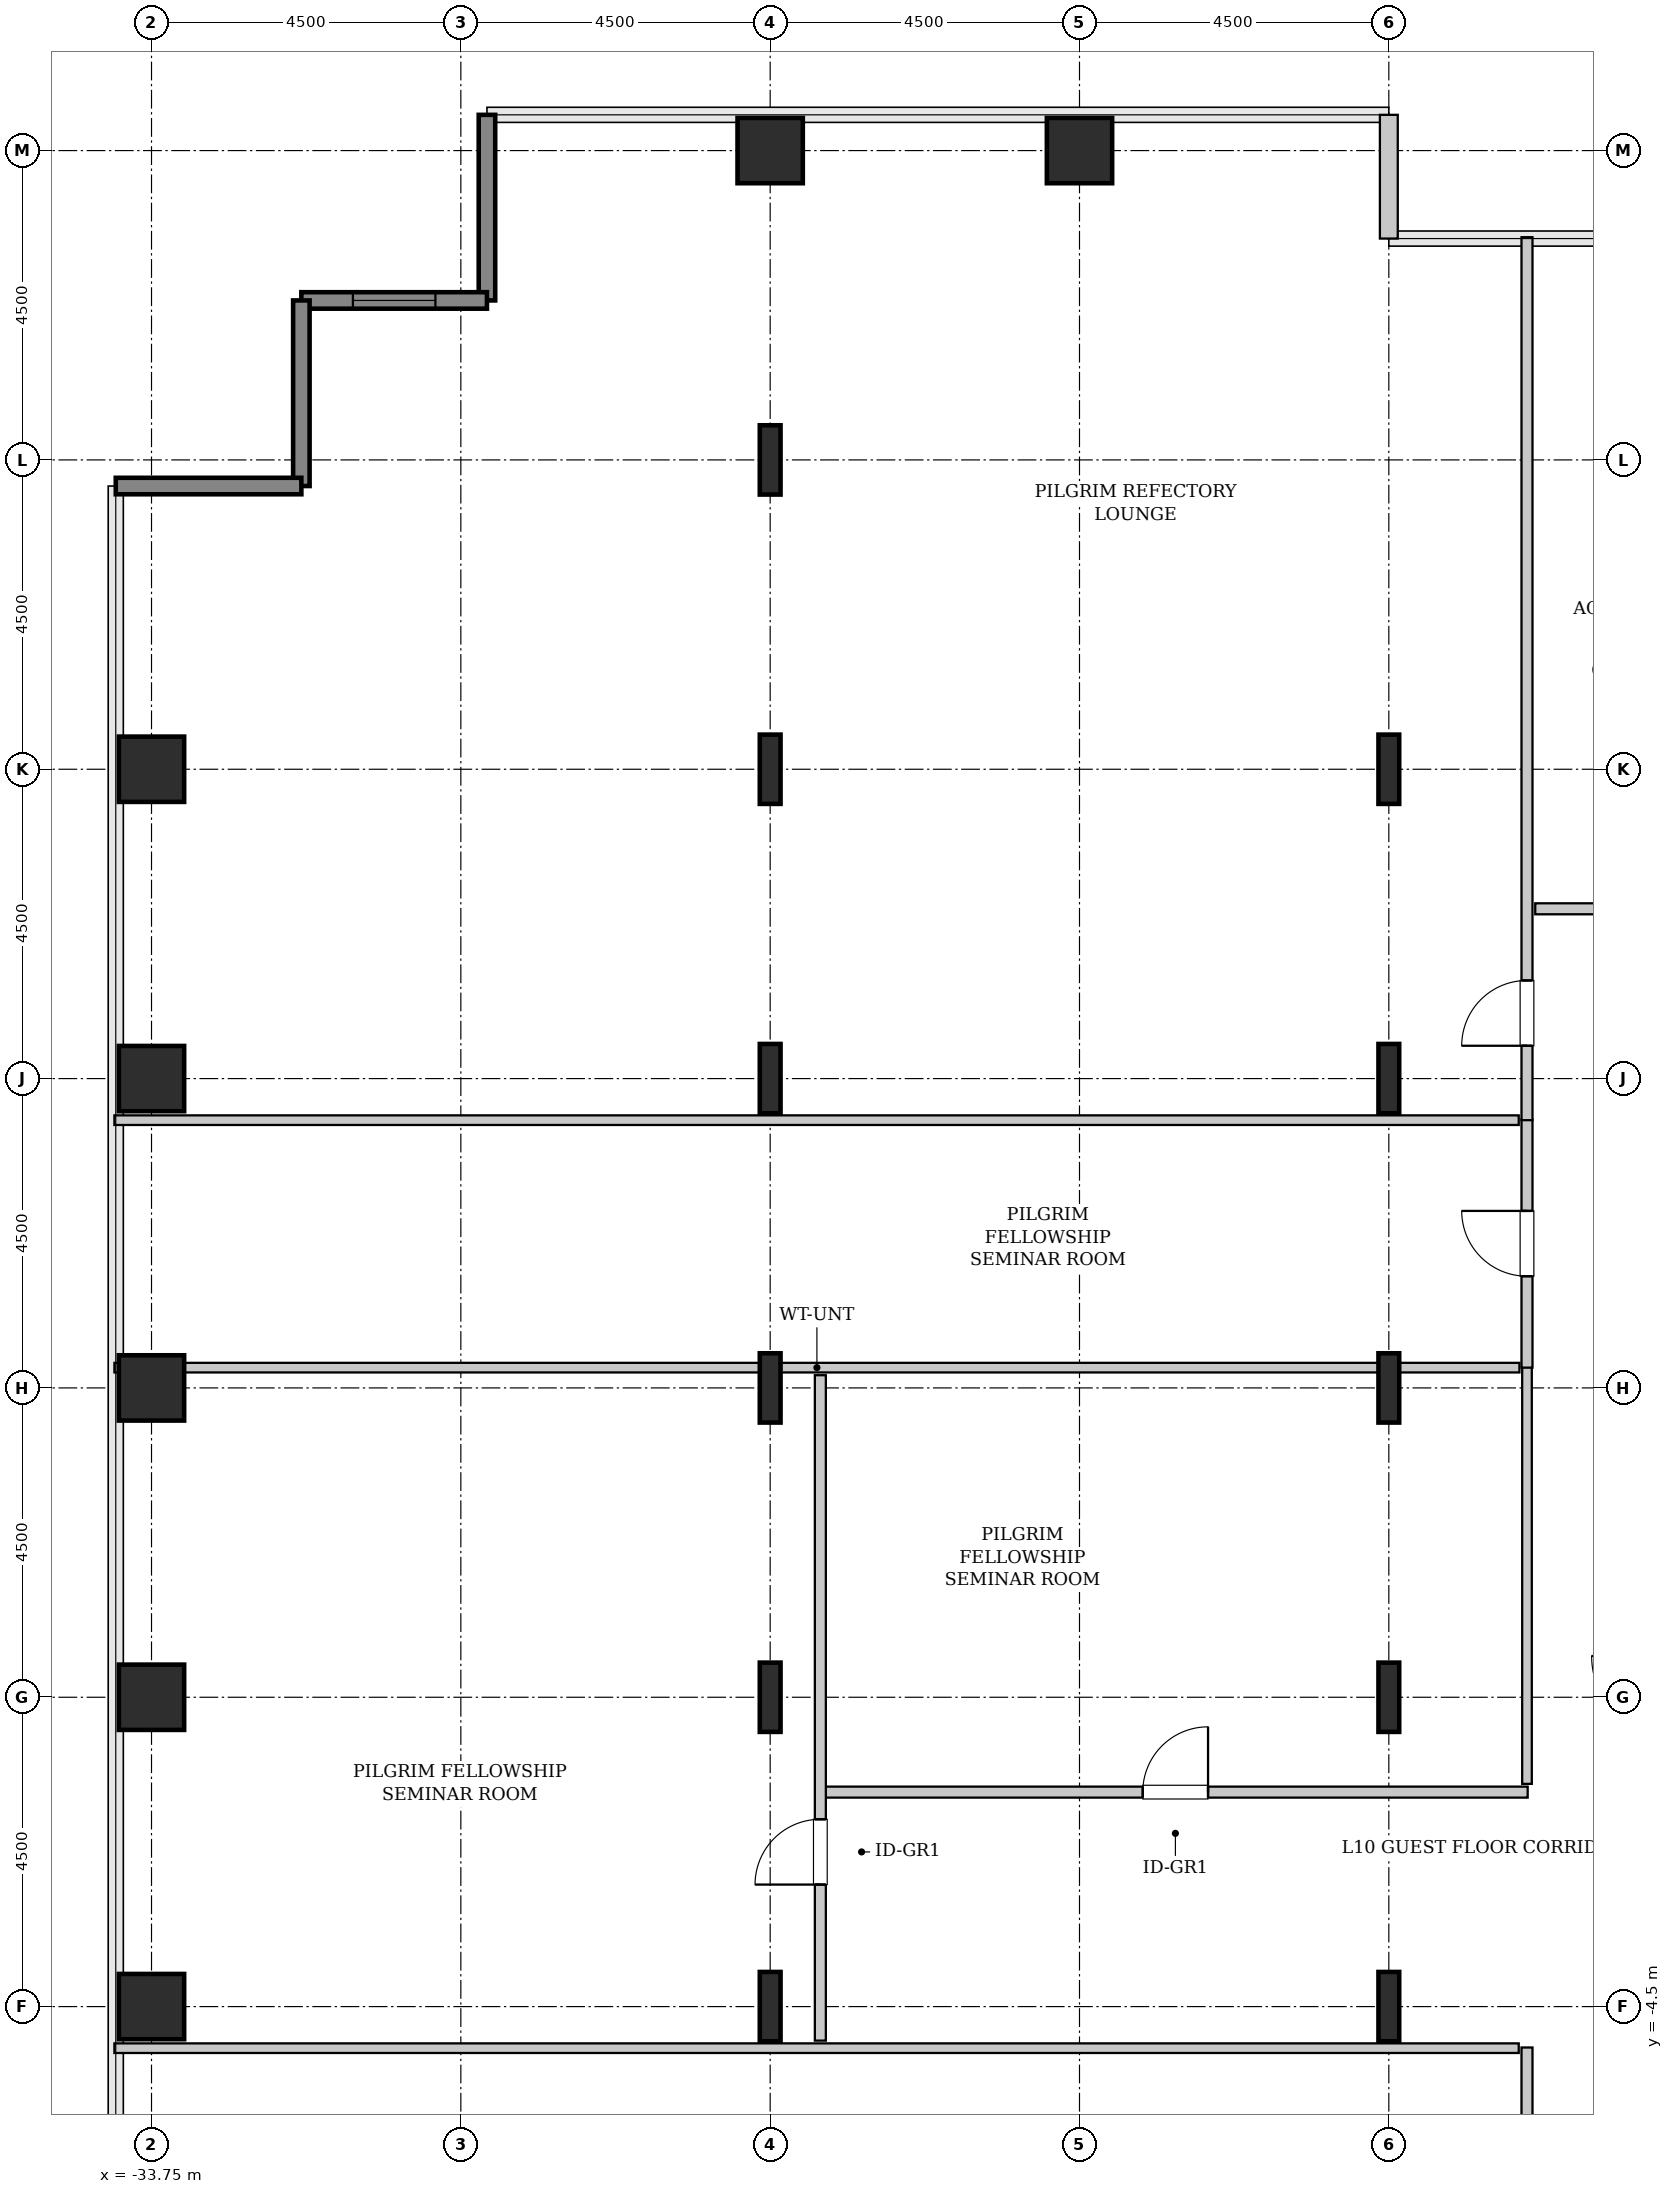
"""IFC4 building model, lengths in metres.
Left out: names, types, materials, properties, quantities, classifications, styles, units other than length and angle.
Written with IfcOpenShell. Run it as: python <this file> out.ifc"""

import sys

from ifc_helpers import new_model, si_unit, direction, frame, frame_2d, origin, origin_2d, place, context, subcontext, project, spatial, rectangle, hollow_rectangle, i_section, extrude, source, transform, mapped, element, fill, save


model = new_model("IFC4")
c1 = context("Model", 3, precision=1e-05, world=origin(), true_north=direction((0.0, 1.0)))
c2 = subcontext(c1, "Body", "Model", "MODEL_VIEW")
j1 = project(units=[si_unit("LENGTHUNIT", "METRE"), si_unit("PLANEANGLEUNIT", "RADIAN")], contexts=[c1])
p1 = place(None, origin())
s1 = spatial("IfcSite", under=j1, at=p1, CompositionType="ELEMENT")
p2 = place(p1, origin())
s2 = spatial("IfcBuilding", under=s1, at=p2, CompositionType="ELEMENT")
p3 = place(p2, frame((0.0, 0.0, 48.2)))
s3 = spatial("IfcBuildingStorey", under=s2, at=p3, CompositionType="ELEMENT", Elevation=48.2)
m1 = source(origin(), c2, "Body", "SweptSolid", [
    extrude(hollow_rectangle(XDim=0.95, YDim=0.95, WallThickness=0.045, InnerFilletRadius=0.045, OuterFilletRadius=0.09, at=origin_2d()), origin(), (0.0, 0.0, 1.0), 3.8),
])
for number, where, z_axis, x_axis in (
    (1, (-33.75, -4.5, 0.0), (0.0, 0.0, 1.0), (1.0, 0.0, 0.0)),
    (2, (-33.75, 0.0, 0.0), (0.0, 0.0, 1.0), (1.0, 0.0, 0.0)),
    (3, (-33.75, 4.5, 0.0), (0.0, 0.0, 1.0), (1.0, 0.0, 0.0)),
    (4, (-33.75, 9.0, 0.0), (0.0, 0.0, 1.0), (1.0, 0.0, 0.0)),
    (5, (-33.75, 13.5, 0.0), (0.0, 0.0, 1.0), (1.0, 0.0, 0.0)),
):
    element("IfcColumn", number, at=place(p3, frame(where, z_axis=z_axis, x_axis=x_axis)), inside=s3, PredefinedType="COLUMN", context=c2, shape_type="MappedRepresentation", body=[
        mapped(m1, transform((0.0, 0.0, 0.0), x_axis=(1.0, 0.0, 0.0), y_axis=(0.0, 1.0, 0.0), z_axis=(0.0, 0.0, 1.0), scale=1.0)),
    ])
m2 = source(origin(), c2, "Body", "SweptSolid", [
    extrude(i_section(OverallWidth=0.302, OverallDepth=1.008, WebThickness=0.021, FlangeThickness=0.04, FilletRadius=0.03, at=origin_2d()), origin(), (0.0, 0.0, 1.0), 3.8),
])
for number, where, z_axis, x_axis in (
    (6, (-24.75, -4.5, 0.0), (0.0, 0.0, 1.0), (1.0, 0.0, 0.0)),
    (7, (-24.75, 0.0, 0.0), (0.0, 0.0, 1.0), (1.0, 0.0, 0.0)),
    (8, (-24.75, 4.5, 0.0), (0.0, 0.0, 1.0), (1.0, 0.0, 0.0)),
    (9, (-24.75, 9.0, 0.0), (0.0, 0.0, 1.0), (1.0, 0.0, 0.0)),
    (10, (-24.75, 13.5, 0.0), (0.0, 0.0, 1.0), (1.0, 0.0, 0.0)),
    (11, (-24.75, 18.0, 0.0), (0.0, 0.0, 1.0), (1.0, 0.0, 0.0)),
):
    element("IfcColumn", number, at=place(p3, frame(where, z_axis=z_axis, x_axis=x_axis)), inside=s3, PredefinedType="COLUMN", context=c2, shape_type="MappedRepresentation", body=[
        mapped(m2, transform((0.0, 0.0, 0.0), x_axis=(1.0, 0.0, 0.0), y_axis=(0.0, 1.0, 0.0), z_axis=(0.0, 0.0, 1.0), scale=1.0)),
    ])
for number, where, z_axis, x_axis in (
    (12, (-24.75, 22.5, 0.0), (0.0, 0.0, 1.0), (1.0, 0.0, 0.0)),
    (13, (-20.25, 22.5, 0.0), (0.0, 0.0, 1.0), (1.0, 0.0, 0.0)),
):
    element("IfcColumn", number, at=place(p3, frame(where, z_axis=z_axis, x_axis=x_axis)), inside=s3, PredefinedType="COLUMN", context=c2, shape_type="MappedRepresentation", body=[
        mapped(m1, transform((0.0, 0.0, 0.0), x_axis=(1.0, 0.0, 0.0), y_axis=(0.0, 1.0, 0.0), z_axis=(0.0, 0.0, 1.0), scale=1.0)),
    ])
for number, where, z_axis, x_axis in (
    (14, (-15.75, -4.5, 0.0), (0.0, 0.0, 1.0), (1.0, 0.0, 0.0)),
    (15, (-15.75, 0.0, 0.0), (0.0, 0.0, 1.0), (1.0, 0.0, 0.0)),
    (16, (-15.75, 4.5, 0.0), (0.0, 0.0, 1.0), (1.0, 0.0, 0.0)),
    (17, (-15.75, 9.0, 0.0), (0.0, 0.0, 1.0), (1.0, 0.0, 0.0)),
    (18, (-15.75, 13.5, 0.0), (0.0, 0.0, 1.0), (1.0, 0.0, 0.0)),
):
    element("IfcColumn", number, at=place(p3, frame(where, z_axis=z_axis, x_axis=x_axis)), inside=s3, PredefinedType="COLUMN", context=c2, shape_type="MappedRepresentation", body=[
        mapped(m2, transform((0.0, 0.0, 0.0), x_axis=(1.0, 0.0, 0.0), y_axis=(0.0, 1.0, 0.0), z_axis=(0.0, 0.0, 1.0), scale=1.0)),
    ])
m3 = source(origin(), c2, "Body", "SweptSolid", [
    extrude(rectangle(XDim=1.8, YDim=0.26, at=frame_2d((0.9, 0.0))), origin(), (0.0, 0.0, 1.0), 3.55),
])
p4 = place(p3, frame((-15.75, 21.22, 0.0), z_axis=(0.0, 0.0, 1.0), x_axis=(0.0, 1.0, 0.0)))
e19 = element("IfcWall", 19, at=p4, inside=s3, PredefinedType="SOLIDWALL", context=c2, shape_type="MappedRepresentation", body=[
    mapped(m3, transform((0.0, 0.0, 0.0), x_axis=(1.0, 0.0, 0.0), y_axis=(0.0, 1.0, 0.0), z_axis=(0.0, 0.0, 1.0), scale=1.0)),
])
m4 = source(origin(), c2, "Body", "SweptSolid", [
    extrude(rectangle(XDim=2.7, YDim=0.24, at=frame_2d((1.35, 0.0))), origin(), (0.0, 0.0, 1.0), 3.55),
])
p5 = place(p3, frame((-28.87, 23.02, 0.0), z_axis=(0.0, 0.0, 1.0), x_axis=(0.0, -1.0, 0.0)))
e20 = element("IfcWall", 20, at=p5, inside=s3, PredefinedType="SHEAR", context=c2, shape_type="MappedRepresentation", body=[
    mapped(m4, transform((0.0, 0.0, 0.0), x_axis=(1.0, 0.0, 0.0), y_axis=(0.0, 1.0, 0.0), z_axis=(0.0, 0.0, 1.0), scale=1.0)),
])
p6 = place(p3, frame((-28.87, 20.32, 0.0), z_axis=(0.0, 0.0, 1.0), x_axis=(-1.0, 0.0, 0.0)))
e21 = element("IfcWall", 21, at=p6, inside=s3, PredefinedType="SHEAR", context=c2, shape_type="MappedRepresentation", body=[
    mapped(m4, transform((0.0, 0.0, 0.0), x_axis=(1.0, 0.0, 0.0), y_axis=(0.0, 1.0, 0.0), z_axis=(0.0, 0.0, 1.0), scale=1.0)),
])
p7 = place(p6, frame((0.75, 0.0, 0.85)))
e22 = element("IfcOpeningElement", 22, at=p7, cuts=e21, PredefinedType="OPENING", context=c2, shape_type="SweptSolid", body=[
    extrude(rectangle(XDim=1.2, YDim=1.8, at=frame_2d((0.6, 0.9))), frame((0.0, 0.13, 0.0), z_axis=(0.0, -1.0, 0.0), x_axis=(1.0, 0.0, 0.0)), (0.0, 0.0, 1.0), 0.26),
])
for number, where, z_axis, x_axis in (
    (23, (-31.57, 20.32, 0.0), (0.0, 0.0, 1.0), (0.0, -1.0, 0.0)),
    (24, (-31.57, 17.62, 0.0), (0.0, 0.0, 1.0), (-1.0, 0.0, 0.0)),
):
    element("IfcWall", number, at=place(p3, frame(where, z_axis=z_axis, x_axis=x_axis)), inside=s3, PredefinedType="SHEAR", context=c2, shape_type="MappedRepresentation", body=[
        mapped(m4, transform((0.0, 0.0, 0.0), x_axis=(1.0, 0.0, 0.0), y_axis=(0.0, 1.0, 0.0), z_axis=(0.0, 0.0, 1.0), scale=1.0)),
    ])
m5 = source(origin(), c2, "Body", "SweptSolid", [
    extrude(rectangle(XDim=3.41, YDim=0.16, at=frame_2d((1.705, 0.0))), origin(), (0.0, 0.0, 1.0), 3.535),
])
p8 = place(p3, frame((-13.74, -8.505, 0.0), z_axis=(0.0, 0.0, 1.0), x_axis=(0.0, 1.0, 0.0)))
e25 = element("IfcWall", 25, at=p8, inside=s3, PredefinedType="PARTITIONING", context=c2, shape_type="MappedRepresentation", body=[
    mapped(m5, transform((0.0, 0.0, 0.0), x_axis=(1.0, 0.0, 0.0), y_axis=(0.0, 1.0, 0.0), z_axis=(0.0, 0.0, 1.0), scale=1.0)),
])
p9 = place(p8, frame((1.23, 0.0, 0.0)))
e26 = element("IfcOpeningElement", 26, at=p9, cuts=e25, PredefinedType="OPENING", context=c2, shape_type="SweptSolid", body=[
    extrude(rectangle(XDim=0.95, YDim=2.1, at=frame_2d((0.475, 1.05))), frame((0.0, 0.09, 0.0), z_axis=(0.0, -1.0, 0.0), x_axis=(1.0, 0.0, 0.0)), (0.0, 0.0, 1.0), 0.18),
])
m6 = source(origin(), c2, "Body", "SweptSolid", [
    extrude(rectangle(XDim=20.43, YDim=0.14, at=frame_2d((10.215, 0.0))), origin(), (0.0, 0.0, 1.0), 3.535),
])
p10 = place(p3, frame((-34.29, -5.105, 0.0), z_axis=(0.0, 0.0, 1.0), x_axis=(1.0, 0.0, 0.0)))
e27 = element("IfcWall", 27, at=p10, inside=s3, PredefinedType="PARTITIONING", context=c2, shape_type="MappedRepresentation", body=[
    mapped(m6, transform((0.0, 0.0, 0.0), x_axis=(1.0, 0.0, 0.0), y_axis=(0.0, 1.0, 0.0), z_axis=(0.0, 0.0, 1.0), scale=1.0)),
])
m7 = source(origin(), c2, "Body", "SweptSolid", [
    extrude(rectangle(XDim=10.25, YDim=0.16, at=frame_2d((5.125, 0.0))), origin(), (0.0, 0.0, 1.0), 3.535),
])
p11 = place(p3, frame((-23.98, -1.38, 0.0), z_axis=(0.0, 0.0, 1.0), x_axis=(1.0, 0.0, 0.0)))
e28 = element("IfcWall", 28, at=p11, inside=s3, PredefinedType="PARTITIONING", context=c2, shape_type="MappedRepresentation", body=[
    mapped(m7, transform((0.0, 0.0, 0.0), x_axis=(1.0, 0.0, 0.0), y_axis=(0.0, 1.0, 0.0), z_axis=(0.0, 0.0, 1.0), scale=1.0)),
])
p12 = place(p11, frame((4.65, 0.0, 0.0)))
e29 = element("IfcOpeningElement", 29, at=p12, cuts=e28, PredefinedType="OPENING", context=c2, shape_type="SweptSolid", body=[
    extrude(rectangle(XDim=0.95, YDim=2.1, at=frame_2d((0.475, 1.05))), frame((0.0, 0.09, 0.0), z_axis=(0.0, -1.0, 0.0), x_axis=(1.0, 0.0, 0.0)), (0.0, 0.0, 1.0), 0.18),
])
m8 = source(origin(), c2, "Body", "SweptSolid", [
    extrude(rectangle(XDim=6.065, YDim=0.14, at=frame_2d((3.032, 0.0))), origin(), (0.0, 0.0, 1.0), 3.535),
])
p13 = place(p3, frame((-13.74, -1.26, 0.0), z_axis=(0.0, 0.0, 1.0), x_axis=(0.0, 1.0, 0.0)))
e30 = element("IfcWall", 30, at=p13, inside=s3, PredefinedType="PARTITIONING", context=c2, shape_type="MappedRepresentation", body=[
    mapped(m8, transform((0.0, 0.0, 0.0), x_axis=(1.0, 0.0, 0.0), y_axis=(0.0, 1.0, 0.0), z_axis=(0.0, 0.0, 1.0), scale=1.0)),
])
m9 = source(origin(), c2, "Body", "SweptSolid", [
    extrude(rectangle(XDim=20.44, YDim=0.14, at=frame_2d((10.22, 0.0))), origin(), (0.0, 0.0, 1.0), 2.825),
])
p14 = place(p3, frame((-34.29, 4.795, 0.0), z_axis=(0.0, 0.0, 1.0), x_axis=(1.0, 0.0, 0.0)))
e31 = element("IfcWall", 31, at=p14, inside=s3, PredefinedType="PARTITIONING", context=c2, shape_type="MappedRepresentation", body=[
    mapped(m9, transform((0.0, 0.0, 0.0), x_axis=(1.0, 0.0, 0.0), y_axis=(0.0, 1.0, 0.0), z_axis=(0.0, 0.0, 1.0), scale=1.0)),
])
m10 = source(origin(), c2, "Body", "SweptSolid", [
    extrude(rectangle(XDim=9.68, YDim=0.16, at=frame_2d((4.84, 0.0))), origin(), (0.0, 0.0, 1.0), 3.535),
])
p15 = place(p3, frame((-24.02, -4.995, 0.0), z_axis=(0.0, 0.0, 1.0), x_axis=(0.0, 1.0, 0.0)))
e32 = element("IfcWall", 32, at=p15, inside=s3, PredefinedType="PARTITIONING", context=c2, shape_type="MappedRepresentation", body=[
    mapped(m10, transform((0.0, 0.0, 0.0), x_axis=(1.0, 0.0, 0.0), y_axis=(0.0, 1.0, 0.0), z_axis=(0.0, 0.0, 1.0), scale=1.0)),
])
p16 = place(p15, frame((2.27, 0.0, 0.0)))
e33 = element("IfcOpeningElement", 33, at=p16, cuts=e32, PredefinedType="OPENING", context=c2, shape_type="SweptSolid", body=[
    extrude(rectangle(XDim=0.95, YDim=2.1, at=frame_2d((0.475, 1.05))), frame((0.0, 0.09, 0.0), z_axis=(0.0, -1.0, 0.0), x_axis=(1.0, 0.0, 0.0)), (0.0, 0.0, 1.0), 0.18),
])
m11 = source(origin(), c2, "Body", "SweptSolid", [
    extrude(rectangle(XDim=3.61, YDim=0.16, at=frame_2d((1.805, 0.0))), origin(), (0.0, 0.0, 1.0), 3.535),
])
p17 = place(p3, frame((-13.74, 4.795, 0.0), z_axis=(0.0, 0.0, 1.0), x_axis=(0.0, 1.0, 0.0)))
e34 = element("IfcWall", 34, at=p17, inside=s3, PredefinedType="PARTITIONING", context=c2, shape_type="MappedRepresentation", body=[
    mapped(m11, transform((0.0, 0.0, 0.0), x_axis=(1.0, 0.0, 0.0), y_axis=(0.0, 1.0, 0.0), z_axis=(0.0, 0.0, 1.0), scale=1.0)),
])
p18 = place(p17, frame((1.33, 0.0, 0.0)))
e35 = element("IfcOpeningElement", 35, at=p18, cuts=e34, PredefinedType="OPENING", context=c2, shape_type="SweptSolid", body=[
    extrude(rectangle(XDim=0.95, YDim=2.1, at=frame_2d((0.475, 1.05))), frame((0.0, 0.09, 0.0), z_axis=(0.0, -1.0, 0.0), x_axis=(1.0, 0.0, 0.0)), (0.0, 0.0, 1.0), 0.18),
])
p19 = place(p3, frame((-34.29, 8.395, 0.0), z_axis=(0.0, 0.0, 1.0), x_axis=(1.0, 0.0, 0.0)))
e36 = element("IfcWall", 36, at=p19, inside=s3, PredefinedType="PARTITIONING", context=c2, shape_type="MappedRepresentation", body=[
    mapped(m6, transform((0.0, 0.0, 0.0), x_axis=(1.0, 0.0, 0.0), y_axis=(0.0, 1.0, 0.0), z_axis=(0.0, 0.0, 1.0), scale=1.0)),
])
m12 = source(origin(), c2, "Body", "SweptSolid", [
    extrude(rectangle(XDim=12.845, YDim=0.16, at=frame_2d((6.422, 0.0))), origin(), (0.0, 0.0, 1.0), 3.535),
])
p20 = place(p3, frame((-13.74, 8.395, 0.0), z_axis=(0.0, 0.0, 1.0), x_axis=(0.0, 1.0, 0.0)))
e37 = element("IfcWall", 37, at=p20, inside=s3, PredefinedType="PARTITIONING", context=c2, shape_type="MappedRepresentation", body=[
    mapped(m12, transform((0.0, 0.0, 0.0), x_axis=(1.0, 0.0, 0.0), y_axis=(0.0, 1.0, 0.0), z_axis=(0.0, 0.0, 1.0), scale=1.0)),
])
p21 = place(p20, frame((1.083, 0.0, 0.0)))
e38 = element("IfcOpeningElement", 38, at=p21, cuts=e37, PredefinedType="OPENING", context=c2, shape_type="SweptSolid", body=[
    extrude(rectangle(XDim=0.95, YDim=2.1, at=frame_2d((0.475, 1.05))), frame((0.0, 0.09, 0.0), z_axis=(0.0, -1.0, 0.0), x_axis=(1.0, 0.0, 0.0)), (0.0, 0.0, 1.0), 0.18),
])
m13 = source(origin(), c2, "Body", "SweptSolid", [
    extrude(rectangle(XDim=4.125, YDim=0.16, at=frame_2d((2.062, 0.0))), origin(), (0.0, 0.0, 1.0), 3.535),
])
p22 = place(p3, frame((-13.62, 11.47, 0.0), z_axis=(0.0, 0.0, 1.0), x_axis=(1.0, 0.0, 0.0)))
e39 = element("IfcWall", 39, at=p22, inside=s3, PredefinedType="PARTITIONING", context=c2, shape_type="MappedRepresentation", body=[
    mapped(m13, transform((0.0, 0.0, 0.0), x_axis=(1.0, 0.0, 0.0), y_axis=(0.0, 1.0, 0.0), z_axis=(0.0, 0.0, 1.0), scale=1.0)),
])
p23 = place(p22, frame((1.587, 0.0, 0.0)))
e40 = element("IfcOpeningElement", 40, at=p23, cuts=e39, PredefinedType="OPENING", context=c2, shape_type="SweptSolid", body=[
    extrude(rectangle(XDim=0.95, YDim=2.1, at=frame_2d((0.475, 1.05))), frame((0.0, 0.09, 0.0), z_axis=(0.0, -1.0, 0.0), x_axis=(1.0, 0.0, 0.0)), (0.0, 0.0, 1.0), 0.18),
])
m14 = source(origin(), c2, "Body", "SweptSolid", [
    extrude(rectangle(XDim=1.2, YDim=1.8, at=frame_2d((0.6, 0.9))), frame((0.0, 0.03, 0.0), z_axis=(0.0, -1.0, 0.0), x_axis=(1.0, 0.0, 0.0)), (0.0, 0.0, 1.0), 0.06),
])
p24 = place(p7, origin())
e41 = element("IfcWindow", 41, at=p24, inside=s3, PartitioningType="SINGLE_PANEL", PredefinedType="WINDOW", context=c2, shape_type="MappedRepresentation", body=[
    mapped(m14, transform((0.0, 0.0, 0.0), x_axis=(1.0, 0.0, 0.0), y_axis=(0.0, 1.0, 0.0), z_axis=(0.0, 0.0, 1.0), scale=1.0)),
])
fill(e22, e41)
m15 = source(origin(), c2, "Body", "SweptSolid", [
    extrude(rectangle(XDim=0.95, YDim=2.1, at=frame_2d((0.475, 1.05))), frame((0.0, 0.025, 0.0), z_axis=(0.0, -1.0, 0.0), x_axis=(1.0, 0.0, 0.0)), (0.0, 0.0, 1.0), 0.05),
])
p25 = place(p12, origin())
e42 = element("IfcDoor", 42, at=p25, inside=s3, OperationType="SINGLE_SWING_RIGHT", PredefinedType="DOOR", context=c2, shape_type="MappedRepresentation", body=[
    mapped(m15, transform((0.0, 0.0, 0.0), x_axis=(1.0, 0.0, 0.0), y_axis=(0.0, 1.0, 0.0), z_axis=(0.0, 0.0, 1.0), scale=1.0)),
])
fill(e29, e42)
p26 = place(p16, origin())
e43 = element("IfcDoor", 43, at=p26, inside=s3, OperationType="SINGLE_SWING_LEFT", PredefinedType="DOOR", context=c2, shape_type="MappedRepresentation", body=[
    mapped(m15, transform((0.0, 0.0, 0.0), x_axis=(1.0, 0.0, 0.0), y_axis=(0.0, 1.0, 0.0), z_axis=(0.0, 0.0, 1.0), scale=1.0)),
])
fill(e33, e43)
p27 = place(p18, origin())
e44 = element("IfcDoor", 44, at=p27, inside=s3, OperationType="SINGLE_SWING_RIGHT", PredefinedType="DOOR", context=c2, shape_type="MappedRepresentation", body=[
    mapped(m15, transform((0.0, 0.0, 0.0), x_axis=(1.0, 0.0, 0.0), y_axis=(0.0, 1.0, 0.0), z_axis=(0.0, 0.0, 1.0), scale=1.0)),
])
fill(e35, e44)
p28 = place(p21, origin())
e45 = element("IfcDoor", 45, at=p28, inside=s3, OperationType="SINGLE_SWING_LEFT", PredefinedType="DOOR", context=c2, shape_type="MappedRepresentation", body=[
    mapped(m15, transform((0.0, 0.0, 0.0), x_axis=(1.0, 0.0, 0.0), y_axis=(0.0, 1.0, 0.0), z_axis=(0.0, 0.0, 1.0), scale=1.0)),
])
fill(e38, e45)
save(model, sys.argv[1])
